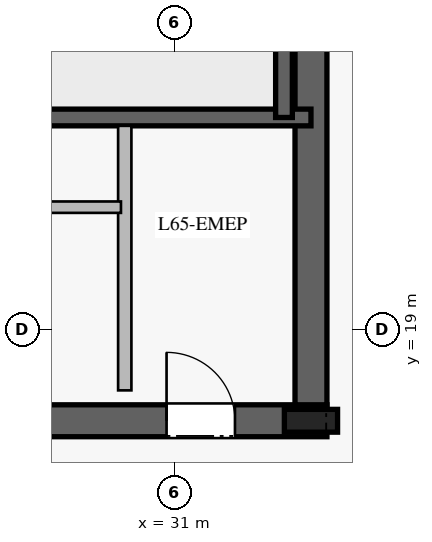
"""IFC4 building model, lengths in metres.
Left out: names, types, materials, properties, quantities, classifications, styles, units other than length and angle.
Written with IfcOpenShell. Run it as: python <this file> out.ifc"""

import sys

from ifc_helpers import new_model, si_unit, direction, frame, frame_2d, origin, origin_2d, place, context, subcontext, project, spatial, rectangle, i_section, extrude, element, fill, save


model = new_model("IFC4")
c1 = context("Model", 3, precision=1e-05, world=origin(), true_north=direction((0.0, 1.0)))
c2 = subcontext(c1, "Body", "Model", "MODEL_VIEW")
j1 = project(units=[si_unit("LENGTHUNIT", "METRE"), si_unit("PLANEANGLEUNIT", "RADIAN")], contexts=[c1])
p1 = place(None, origin())
s1 = spatial("IfcSite", under=j1, at=p1, CompositionType="ELEMENT")
p2 = place(p1, origin())
s2 = spatial("IfcBuilding", under=s1, at=p2, CompositionType="ELEMENT")
p3 = place(p2, frame((0.0, 0.0, 270.2)))
s3 = spatial("IfcBuildingStorey", under=s2, at=p3, CompositionType="ELEMENT", Elevation=270.2)
p4 = place(p3, frame((16.99, 17.8, 0.0), z_axis=(0.0, 0.0, 1.0), x_axis=(1.0, 0.0, 0.0)))
e1 = element("IfcWall", 1, at=p4, inside=s3, PredefinedType="SHEAR", context=c2, shape_type="SweptSolid", body=[
    extrude(rectangle(XDim=16.02, YDim=0.42, at=frame_2d((8.01, 0.0))), origin(), (0.0, 0.0, 1.0), 3.78),
])
p5 = place(p4, frame((4.96, 0.0, 0.0)))
e2 = element("IfcOpeningElement", 2, at=p5, cuts=e1, PredefinedType="OPENING", context=c2, shape_type="SweptSolid", body=[
    extrude(rectangle(XDim=1.2, YDim=2.25, at=frame_2d((0.6, 1.125))), frame((0.0, 0.22, 0.0), z_axis=(0.0, -1.0, 0.0), x_axis=(1.0, 0.0, 0.0)), (0.0, 0.0, 1.0), 0.44),
])
p6 = place(p4, frame((13.91, 0.0, 0.0)))
e3 = element("IfcOpeningElement", 3, at=p6, cuts=e1, PredefinedType="OPENING", context=c2, shape_type="SweptSolid", body=[
    extrude(rectangle(XDim=0.9, YDim=2.1, at=frame_2d((0.45, 1.05))), frame((0.0, 0.22, 0.0), z_axis=(0.0, -1.0, 0.0), x_axis=(1.0, 0.0, 0.0)), (0.0, 0.0, 1.0), 0.44),
])
p7 = place(p4, frame((9.785, 0.0, 0.0)))
e4 = element("IfcOpeningElement", 4, at=p7, cuts=e1, PredefinedType="OPENING", context=c2, shape_type="SweptSolid", body=[
    extrude(rectangle(XDim=1.1, YDim=2.2, at=frame_2d((0.55, 1.1))), frame((0.0, 0.22, 0.0), z_axis=(0.0, -1.0, 0.0), x_axis=(1.0, 0.0, 0.0)), (0.0, 0.0, 1.0), 0.44),
])
p8 = place(p3, frame((32.8, 18.01, 0.0), z_axis=(0.0, 0.0, 1.0), x_axis=(0.0, 1.0, 0.0)))
e5 = element("IfcWall", 5, at=p8, inside=s3, PredefinedType="SHEAR", context=c2, shape_type="SweptSolid", body=[
    extrude(rectangle(XDim=13.98, YDim=0.42, at=frame_2d((6.99, 0.0))), origin(), (0.0, 0.0, 1.0), 3.78),
])
p9 = place(p3, frame((32.8, 17.8, 0.0), z_axis=(0.0, 0.0, 1.0), x_axis=(1.0, 0.0, 0.0)))
e6 = element("IfcColumn", 6, at=p9, inside=s3, PredefinedType="COLUMN", context=c2, shape_type="SweptSolid", body=[
    extrude(i_section(OverallWidth=0.3, OverallDepth=0.7, WebThickness=0.017, FlangeThickness=0.032, at=origin_2d()), origin(), (0.0, 0.0, 1.0), 4.0),
])
p10 = place(p3, frame((29.08, 21.79, 0.0), z_axis=(0.0, 0.0, 1.0), x_axis=(1.0, 0.0, 0.0)))
e7 = element("IfcWall", 7, at=p10, inside=s3, PredefinedType="SOLIDWALL", context=c2, shape_type="SweptSolid", body=[
    extrude(rectangle(XDim=3.72, YDim=0.22, at=frame_2d((1.86, 0.0))), origin(), (0.0, 0.0, 1.0), 3.78),
])
p11 = place(p3, frame((32.445, 29.01, 0.0), z_axis=(0.0, 0.0, 1.0), x_axis=(0.0, -1.0, 0.0)))
e8 = element("IfcWall", 8, at=p11, inside=s3, PredefinedType="SOLIDWALL", context=c2, shape_type="SweptSolid", body=[
    extrude(rectangle(XDim=7.22, YDim=0.22, at=frame_2d((3.61, 0.0))), origin(), (0.0, 0.0, 1.0), 3.78),
])
p12 = place(p3, frame((30.35, 18.2, 0.0), z_axis=(0.0, 0.0, 1.0), x_axis=(0.0, 1.0, 0.0)))
e9 = element("IfcWall", 9, at=p12, inside=s3, PredefinedType="PARTITIONING", context=c2, shape_type="SweptSolid", body=[
    extrude(rectangle(XDim=3.48, YDim=0.175, at=frame_2d((1.74, 0.0))), origin(), (0.0, 0.0, 1.0), 3.78),
])
p13 = place(p3, frame((24.4, 20.61, 0.0), z_axis=(0.0, 0.0, 1.0), x_axis=(1.0, 0.0, 0.0)))
e10 = element("IfcWall", 10, at=p13, inside=s3, PredefinedType="PARTITIONING", context=c2, shape_type="SweptSolid", body=[
    extrude(rectangle(XDim=5.9, YDim=0.15, at=frame_2d((2.95, 0.0))), origin(), (0.0, 0.0, 1.0), 3.78),
])
p14 = place(p6, origin())
e11 = element("IfcDoor", 11, at=p14, inside=s3, OperationType="SINGLE_SWING_LEFT", PredefinedType="DOOR", context=c2, shape_type="SweptSolid", body=[
    extrude(rectangle(XDim=0.9, YDim=2.1, at=frame_2d((0.45, 1.05))), frame((0.0, 0.025, 0.0), z_axis=(0.0, -1.0, 0.0), x_axis=(1.0, 0.0, 0.0)), (0.0, 0.0, 1.0), 0.05),
])
fill(e3, e11)
save(model, sys.argv[1])
